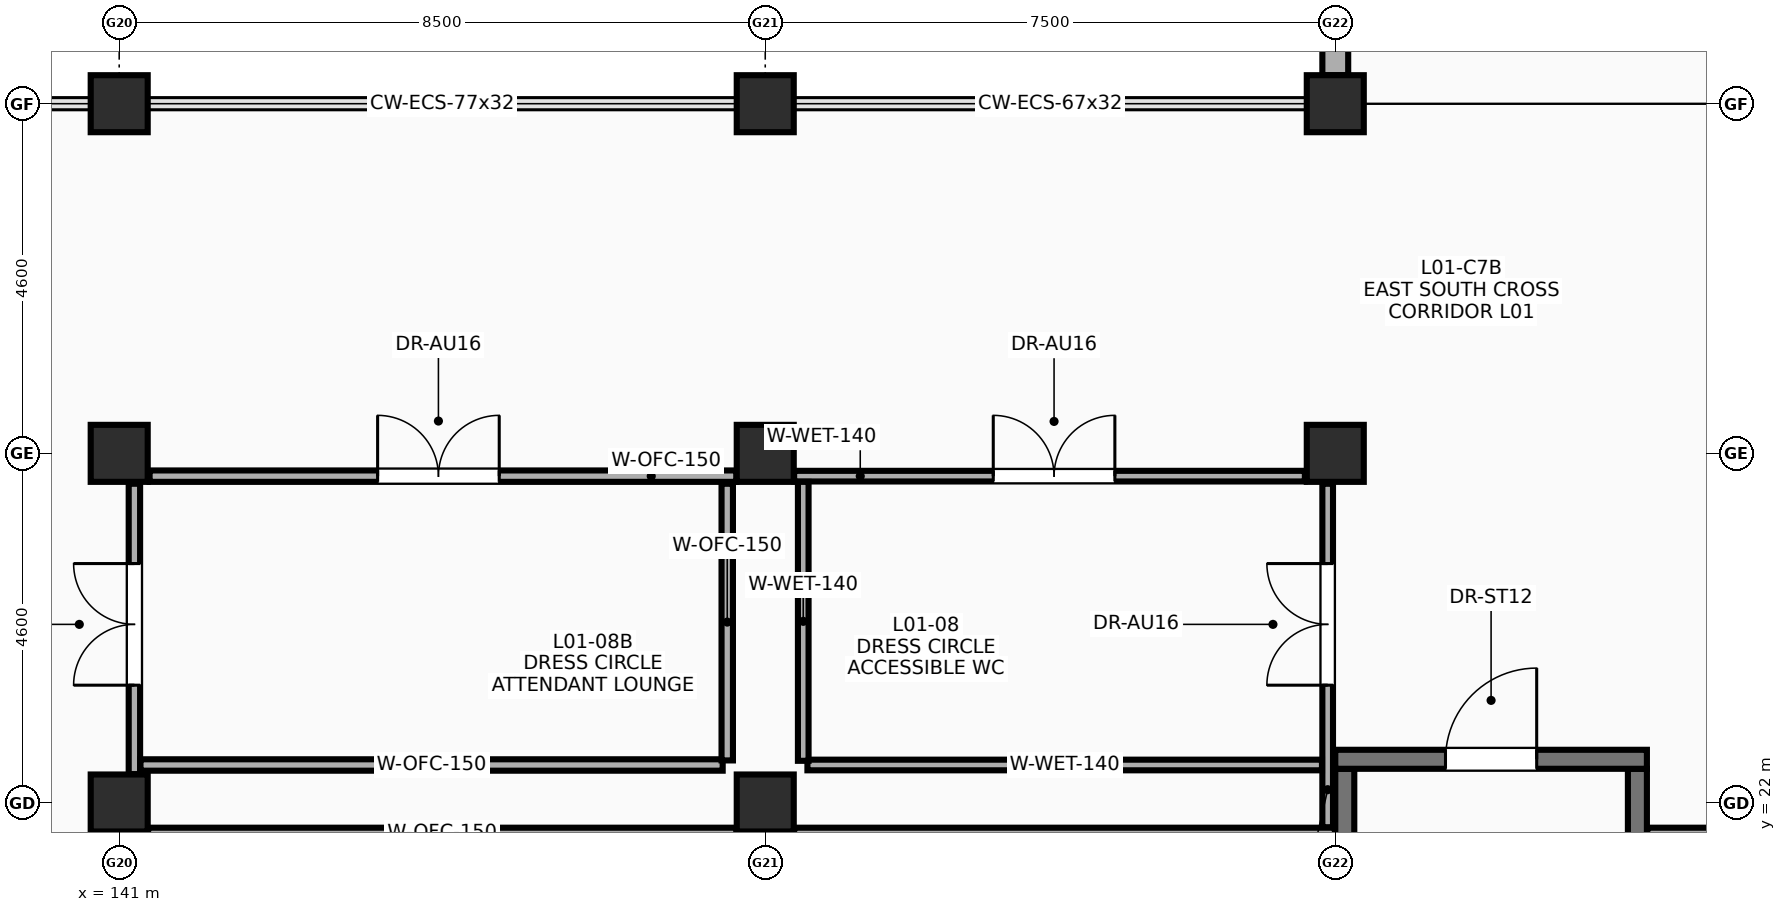
"""IFC4 building model, lengths in metres.
Left out: names, types, materials, properties, quantities, classifications, styles, units other than length and angle.
Written with IfcOpenShell. Run it as: python <this file> out.ifc"""

import sys

from ifc_helpers import new_model, si_unit, direction, frame, frame_2d, origin, origin_2d, place, context, subcontext, project, spatial, rectangle, extrude, element, fill, save


model = new_model("IFC4")
c1 = context("Model", 3, precision=1e-05, world=origin(), true_north=direction((0.0, 1.0)))
c2 = subcontext(c1, "Body", "Model", "MODEL_VIEW")
j1 = project(units=[si_unit("LENGTHUNIT", "METRE"), si_unit("PLANEANGLEUNIT", "RADIAN")], contexts=[c1])
p1 = place(None, origin())
s1 = spatial("IfcSite", under=j1, at=p1, CompositionType="ELEMENT")
p2 = place(p1, origin())
s2 = spatial("IfcBuilding", under=s1, at=p2, CompositionType="ELEMENT")
p3 = place(p2, frame((0.0, 0.0, 5.4)))
s3 = spatial("IfcBuildingStorey", under=s2, at=p3, CompositionType="ELEMENT", Elevation=5.4)
for number, where, z_axis, x_axis in (
    (1, (141.0, 22.0, 0.0), (0.0, 0.0, 1.0), (1.0, 0.0, 0.0)),
    (2, (141.0, 26.6, 0.0), (0.0, 0.0, 1.0), (1.0, 0.0, 0.0)),
    (3, (141.0, 31.2, 0.0), (0.0, 0.0, 1.0), (1.0, 0.0, 0.0)),
    (4, (149.5, 22.0, 0.0), (0.0, 0.0, 1.0), (1.0, 0.0, 0.0)),
    (5, (149.5, 26.6, 0.0), (0.0, 0.0, 1.0), (1.0, 0.0, 0.0)),
    (6, (149.5, 31.2, 0.0), (0.0, 0.0, 1.0), (1.0, 0.0, 0.0)),
    (7, (157.0, 26.6, 0.0), (0.0, 0.0, 1.0), (1.0, 0.0, 0.0)),
    (8, (157.0, 31.2, 0.0), (0.0, 0.0, 1.0), (1.0, 0.0, 0.0)),
):
    element("IfcColumn", number, at=place(p3, frame(where, z_axis=z_axis, x_axis=x_axis)), inside=s3, PredefinedType="COLUMN", context=c2, shape_type="SweptSolid", body=[
        extrude(rectangle(XDim=0.75, YDim=0.75, at=origin_2d()), origin(), (0.0, 0.0, 1.0), 4.4),
    ])
p4 = place(p3, frame((157.0, 31.575, 0.0), z_axis=(0.0, 0.0, 1.0), x_axis=(0.0, 1.0, 0.0)))
e9 = element("IfcWall", 9, at=p4, inside=s3, PredefinedType="SOLIDWALL", context=c2, shape_type="SweptSolid", body=[
    extrude(rectangle(XDim=3.85, YDim=0.34, at=frame_2d((1.925, 0.0))), origin(), (0.0, 0.0, 1.0), 3.2),
])
for number, where, z_axis, x_axis in (
    (10, (157.125, 14.25, 0.0), (0.0, 0.0, 1.0), (0.0, 1.0, 0.0)),
    (11, (160.975, 14.25, 0.0), (0.0, 0.0, 1.0), (0.0, 1.0, 0.0)),
):
    element("IfcWall", number, at=place(p3, frame(where, z_axis=z_axis, x_axis=x_axis)), inside=s3, PredefinedType="SHEAR", context=c2, shape_type="SweptSolid", body=[
        extrude(rectangle(XDim=8.2, YDim=0.25, at=frame_2d((4.1, 0.0))), origin(), (0.0, 0.0, 1.0), 4.4),
    ])
p5 = place(p3, frame((157.0, 22.575, 0.0), z_axis=(0.0, 0.0, 1.0), x_axis=(1.0, 0.0, 0.0)))
e12 = element("IfcWall", 12, at=p5, inside=s3, PredefinedType="SHEAR", context=c2, shape_type="SweptSolid", body=[
    extrude(rectangle(XDim=4.1, YDim=0.25, at=frame_2d((2.05, 0.0))), origin(), (0.0, 0.0, 1.0), 4.4),
])
p6 = place(p5, frame((1.45, 0.0, 0.0)))
e13 = element("IfcOpeningElement", 13, at=p6, cuts=e12, PredefinedType="OPENING", context=c2, shape_type="SweptSolid", body=[
    extrude(rectangle(XDim=1.2, YDim=2.15, at=frame_2d((0.6, 1.075))), frame((0.0, 0.135, 0.0), z_axis=(0.0, -1.0, 0.0), x_axis=(1.0, 0.0, 0.0)), (0.0, 0.0, 1.0), 0.27),
])
p7 = place(p3, frame((141.4, 26.3, 0.0), z_axis=(0.0, 0.0, 1.0), x_axis=(1.0, 0.0, 0.0)))
e14 = element("IfcWall", 14, at=p7, inside=s3, PredefinedType="PARTITIONING", context=c2, shape_type="SweptSolid", body=[
    extrude(rectangle(XDim=7.72, YDim=0.15, at=frame_2d((3.86, 0.0))), origin(), (0.0, 0.0, 1.0), 3.3),
])
p8 = place(p7, frame((3.0, 0.0, 0.0)))
e15 = element("IfcOpeningElement", 15, at=p8, cuts=e14, PredefinedType="OPENING", context=c2, shape_type="SweptSolid", body=[
    extrude(rectangle(XDim=1.6, YDim=2.25, at=frame_2d((0.8, 1.125))), frame((0.0, 0.085, 0.0), z_axis=(0.0, -1.0, 0.0), x_axis=(1.0, 0.0, 0.0)), (0.0, 0.0, 1.0), 0.17),
])
p9 = place(p3, frame((141.2, 22.38, 0.0), z_axis=(0.0, 0.0, 1.0), x_axis=(0.0, 1.0, 0.0)))
e16 = element("IfcWall", 16, at=p9, inside=s3, PredefinedType="PARTITIONING", context=c2, shape_type="SweptSolid", body=[
    extrude(rectangle(XDim=3.82, YDim=0.15, at=frame_2d((1.91, 0.0))), origin(), (0.0, 0.0, 1.0), 3.5),
])
p10 = place(p9, frame((1.17, 0.0, 0.0)))
e17 = element("IfcOpeningElement", 17, at=p10, cuts=e16, PredefinedType="OPENING", context=c2, shape_type="SweptSolid", body=[
    extrude(rectangle(XDim=1.6, YDim=2.25, at=frame_2d((0.8, 1.125))), frame((0.0, 0.085, 0.0), z_axis=(0.0, -1.0, 0.0), x_axis=(1.0, 0.0, 0.0)), (0.0, 0.0, 1.0), 0.17),
])
p11 = place(p3, frame((149.88, 26.3, 0.0), z_axis=(0.0, 0.0, 1.0), x_axis=(1.0, 0.0, 0.0)))
e18 = element("IfcWall", 18, at=p11, inside=s3, PredefinedType="PARTITIONING", context=c2, shape_type="SweptSolid", body=[
    extrude(rectangle(XDim=6.72, YDim=0.14, at=frame_2d((3.36, 0.0))), origin(), (0.0, 0.0, 1.0), 3.3),
])
p12 = place(p11, frame((2.62, 0.0, 0.0)))
e19 = element("IfcOpeningElement", 19, at=p12, cuts=e18, PredefinedType="OPENING", context=c2, shape_type="SweptSolid", body=[
    extrude(rectangle(XDim=1.6, YDim=2.25, at=frame_2d((0.8, 1.125))), frame((0.0, 0.08, 0.0), z_axis=(0.0, -1.0, 0.0), x_axis=(1.0, 0.0, 0.0)), (0.0, 0.0, 1.0), 0.16),
])
p13 = place(p3, frame((156.9, 21.68, 0.0), z_axis=(0.0, 0.0, 1.0), x_axis=(0.0, 1.0, 0.0)))
e20 = element("IfcWall", 20, at=p13, inside=s3, PredefinedType="PARTITIONING", context=c2, shape_type="SweptSolid", body=[
    extrude(rectangle(XDim=4.52, YDim=0.14, at=frame_2d((2.26, 0.0))), origin(), (0.0, 0.0, 1.0), 3.5),
])
p14 = place(p13, frame((1.87, 0.0, 0.0)))
e21 = element("IfcOpeningElement", 21, at=p14, cuts=e20, PredefinedType="OPENING", context=c2, shape_type="SweptSolid", body=[
    extrude(rectangle(XDim=1.6, YDim=2.25, at=frame_2d((0.8, 1.125))), frame((0.0, 0.08, 0.0), z_axis=(0.0, -1.0, 0.0), x_axis=(1.0, 0.0, 0.0)), (0.0, 0.0, 1.0), 0.16),
])
p15 = place(p3, frame((141.38, 21.6, 0.0), z_axis=(0.0, 0.0, 1.0), x_axis=(1.0, 0.0, 0.0)))
e22 = element("IfcWall", 22, at=p15, inside=s3, PredefinedType="PARTITIONING", context=c2, shape_type="SweptSolid", body=[
    extrude(rectangle(XDim=7.74, YDim=0.15, at=frame_2d((3.87, 0.0))), origin(), (0.0, 0.0, 1.0), 4.02),
])
p16 = place(p3, frame((149.88, 21.6, 0.0), z_axis=(0.0, 0.0, 1.0), x_axis=(1.0, 0.0, 0.0)))
e23 = element("IfcWall", 23, at=p16, inside=s3, PredefinedType="PARTITIONING", context=c2, shape_type="SweptSolid", body=[
    extrude(rectangle(XDim=7.115, YDim=0.15, at=frame_2d((3.558, 0.0))), origin(), (0.0, 0.0, 1.0), 3.5),
])
p17 = place(p3, frame((161.105, 21.6, 0.0), z_axis=(0.0, 0.0, 1.0), x_axis=(1.0, 0.0, 0.0)))
e24 = element("IfcWall", 24, at=p17, inside=s3, PredefinedType="PARTITIONING", context=c2, shape_type="SweptSolid", body=[
    extrude(rectangle(XDim=1.015, YDim=0.15, at=frame_2d((0.508, 0.0))), origin(), (0.0, 0.0, 1.0), 4.02),
])
p18 = place(p3, frame((141.28, 22.5, 0.0), z_axis=(0.0, 0.0, 1.0), x_axis=(1.0, 0.0, 0.0)))
e25 = element("IfcWall", 25, at=p18, inside=s3, PredefinedType="PARTITIONING", context=c2, shape_type="SweptSolid", body=[
    extrude(rectangle(XDim=7.66, YDim=0.15, at=frame_2d((3.83, 0.0))), origin(), (0.0, 0.0, 1.0), 3.5),
])
p19 = place(p3, frame((149.0, 22.56, 0.0), z_axis=(0.0, 0.0, 1.0), x_axis=(0.0, 1.0, 0.0)))
e26 = element("IfcWall", 26, at=p19, inside=s3, PredefinedType="PARTITIONING", context=c2, shape_type="SweptSolid", body=[
    extrude(rectangle(XDim=3.64, YDim=0.15, at=frame_2d((1.82, 0.0))), origin(), (0.0, 0.0, 1.0), 4.02),
])
p20 = place(p3, frame((150.055, 22.5, 0.0), z_axis=(0.0, 0.0, 1.0), x_axis=(1.0, 0.0, 0.0)))
e27 = element("IfcWall", 27, at=p20, inside=s3, PredefinedType="PARTITIONING", context=c2, shape_type="SweptSolid", body=[
    extrude(rectangle(XDim=6.77, YDim=0.14, at=frame_2d((3.385, 0.0))), origin(), (0.0, 0.0, 1.0), 3.5),
])
p21 = place(p3, frame((150.0, 22.555, 0.0), z_axis=(0.0, 0.0, 1.0), x_axis=(0.0, 1.0, 0.0)))
e28 = element("IfcWall", 28, at=p21, inside=s3, PredefinedType="PARTITIONING", context=c2, shape_type="SweptSolid", body=[
    extrude(rectangle(XDim=3.67, YDim=0.14, at=frame_2d((1.835, 0.0))), origin(), (0.0, 0.0, 1.0), 3.3),
])
p22 = place(p6, origin())
e29 = element("IfcDoor", 29, at=p22, inside=s3, OperationType="SINGLE_SWING_RIGHT", PredefinedType="DOOR", context=c2, shape_type="SweptSolid", body=[
    extrude(rectangle(XDim=1.2, YDim=2.15, at=frame_2d((0.6, 1.075))), frame((0.0, 0.025, 0.0), z_axis=(0.0, -1.0, 0.0), x_axis=(1.0, 0.0, 0.0)), (0.0, 0.0, 1.0), 0.05),
])
fill(e13, e29)
p23 = place(p8, origin())
e30 = element("IfcDoor", 30, at=p23, inside=s3, OperationType="DOUBLE_DOOR_SINGLE_SWING", PredefinedType="DOOR", context=c2, shape_type="SweptSolid", body=[
    extrude(rectangle(XDim=1.6, YDim=2.25, at=frame_2d((0.8, 1.125))), frame((0.0, 0.025, 0.0), z_axis=(0.0, -1.0, 0.0), x_axis=(1.0, 0.0, 0.0)), (0.0, 0.0, 1.0), 0.05),
])
fill(e15, e30)
p24 = place(p10, origin())
e31 = element("IfcDoor", 31, at=p24, inside=s3, OperationType="DOUBLE_DOOR_SINGLE_SWING", PredefinedType="DOOR", context=c2, shape_type="SweptSolid", body=[
    extrude(rectangle(XDim=1.6, YDim=2.25, at=frame_2d((0.8, 1.125))), frame((0.0, 0.025, 0.0), z_axis=(0.0, -1.0, 0.0), x_axis=(1.0, 0.0, 0.0)), (0.0, 0.0, 1.0), 0.05),
])
fill(e17, e31)
p25 = place(p12, origin())
e32 = element("IfcDoor", 32, at=p25, inside=s3, OperationType="DOUBLE_DOOR_SINGLE_SWING", PredefinedType="DOOR", context=c2, shape_type="SweptSolid", body=[
    extrude(rectangle(XDim=1.6, YDim=2.25, at=frame_2d((0.8, 1.125))), frame((0.0, 0.025, 0.0), z_axis=(0.0, -1.0, 0.0), x_axis=(1.0, 0.0, 0.0)), (0.0, 0.0, 1.0), 0.05),
])
fill(e19, e32)
p26 = place(p14, origin())
e33 = element("IfcDoor", 33, at=p26, inside=s3, OperationType="DOUBLE_DOOR_SINGLE_SWING", PredefinedType="DOOR", context=c2, shape_type="SweptSolid", body=[
    extrude(rectangle(XDim=1.6, YDim=2.25, at=frame_2d((0.8, 1.125))), frame((0.0, 0.025, 0.0), z_axis=(0.0, -1.0, 0.0), x_axis=(1.0, 0.0, 0.0)), (0.0, 0.0, 1.0), 0.05),
])
fill(e21, e33)
save(model, sys.argv[1])
